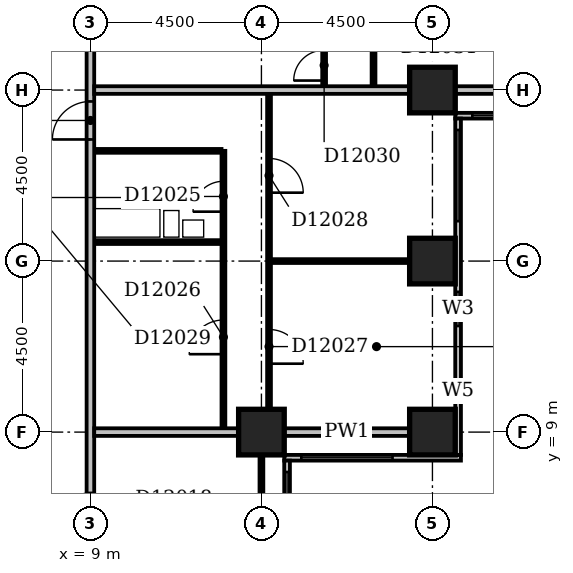
"""IFC4 building model, lengths in metres.
Left out: names, types, materials, properties, quantities, classifications, styles, units other than length and angle.
Written with IfcOpenShell. Run it as: python <this file> out.ifc"""

import sys

from ifc_helpers import new_model, si_unit, direction, frame, frame_2d, origin, origin_2d, place, context, subcontext, project, spatial, rectangle, extrude, element, fill, save


model = new_model("IFC4")
c1 = context("Model", 3, precision=1e-05, world=origin(), true_north=direction((0.0, 1.0)))
c2 = subcontext(c1, "Body", "Model", "MODEL_VIEW")
j1 = project(units=[si_unit("LENGTHUNIT", "METRE"), si_unit("PLANEANGLEUNIT", "RADIAN")], contexts=[c1])
p1 = place(None, origin())
s1 = spatial("IfcSite", under=j1, at=p1, CompositionType="ELEMENT")
p2 = place(p1, origin())
s2 = spatial("IfcBuilding", under=s1, at=p2, CompositionType="ELEMENT")
p3 = place(p2, frame((0.0, 0.0, 54.2)))
s3 = spatial("IfcBuildingStorey", under=s2, at=p3, CompositionType="ELEMENT", Elevation=54.2)
for number, where, z_axis, x_axis in (
    (1, (13.5, 9.0, -0.3), (0.0, 0.0, 1.0), (1.0, 0.0, 0.0)),
    (2, (18.0, 9.0, -0.3), (0.0, 0.0, 1.0), (1.0, 0.0, 0.0)),
    (3, (18.0, 13.5, -0.3), (0.0, 0.0, 1.0), (1.0, 0.0, 0.0)),
    (4, (18.0, 18.0, -0.3), (0.0, 0.0, 1.0), (1.0, 0.0, 0.0)),
):
    element("IfcColumn", number, at=place(p3, frame(where, z_axis=z_axis, x_axis=x_axis)), inside=s3, PredefinedType="COLUMN", context=c2, shape_type="SweptSolid", body=[
        extrude(rectangle(XDim=1.2, YDim=1.2, at=origin_2d()), origin(), (0.0, 0.0, 1.0), 3.6),
    ])
p4 = place(p3, frame((14.175, 3.9, 0.0), z_axis=(0.0, 0.0, 1.0), x_axis=(0.0, 1.0, 0.0)))
e5 = element("IfcWall", 5, at=p4, inside=s3, PredefinedType="STANDARD", context=c2, shape_type="SweptSolid", body=[
    extrude(rectangle(XDim=4.35, YDim=0.15, at=frame_2d((2.175, 0.0))), origin(), (0.0, 0.0, 1.0), 2.7),
])
p5 = place(p4, frame((1.65, 0.0, 0.6)))
e6 = element("IfcOpeningElement", 6, at=p5, cuts=e5, PredefinedType="OPENING", context=c2, shape_type="SweptSolid", body=[
    extrude(rectangle(XDim=2.4, YDim=1.8, at=frame_2d((1.2, 0.9))), frame((0.0, 0.087, 0.0), z_axis=(0.0, -1.0, 0.0), x_axis=(1.0, 0.0, 0.0)), (0.0, 0.0, 1.0), 0.174),
])
p6 = place(p3, frame((14.1, 8.325, 0.0), z_axis=(0.0, 0.0, 1.0), x_axis=(1.0, 0.0, 0.0)))
e7 = element("IfcWall", 7, at=p6, inside=s3, PredefinedType="STANDARD", context=c2, shape_type="SweptSolid", body=[
    extrude(rectangle(XDim=4.65, YDim=0.15, at=frame_2d((2.325, 0.0))), origin(), (0.0, 0.0, 1.0), 2.7),
])
p7 = place(p6, frame((0.45, 0.0, 0.6)))
e8 = element("IfcOpeningElement", 8, at=p7, cuts=e7, PredefinedType="OPENING", context=c2, shape_type="SweptSolid", body=[
    extrude(rectangle(XDim=2.4, YDim=1.8, at=frame_2d((1.2, 0.9))), frame((0.0, 0.087, 0.0), z_axis=(0.0, -1.0, 0.0), x_axis=(1.0, 0.0, 0.0)), (0.0, 0.0, 1.0), 0.174),
])
p8 = place(p3, frame((18.675, 8.4, 0.0), z_axis=(0.0, 0.0, 1.0), x_axis=(0.0, 1.0, 0.0)))
e9 = element("IfcWall", 9, at=p8, inside=s3, PredefinedType="STANDARD", context=c2, shape_type="SweptSolid", body=[
    extrude(rectangle(XDim=8.85, YDim=0.15, at=frame_2d((4.425, 0.0))), origin(), (0.0, 0.0, 1.0), 2.7),
])
p9 = place(p8, frame((1.461, 0.0, 0.6)))
e10 = element("IfcOpeningElement", 10, at=p9, cuts=e9, PredefinedType="OPENING", context=c2, shape_type="SweptSolid", body=[
    extrude(rectangle(XDim=0.45, YDim=1.8, at=frame_2d((0.225, 0.9))), frame((0.0, 0.087, 0.0), z_axis=(0.0, -1.0, 0.0), x_axis=(1.0, 0.0, 0.0)), (0.0, 0.0, 1.0), 0.174),
])
p10 = place(p8, frame((3.391, 0.0, 0.6)))
e11 = element("IfcOpeningElement", 11, at=p10, cuts=e9, PredefinedType="OPENING", context=c2, shape_type="SweptSolid", body=[
    extrude(rectangle(XDim=0.9, YDim=1.8, at=frame_2d((0.45, 0.9))), frame((0.0, 0.087, 0.0), z_axis=(0.0, -1.0, 0.0), x_axis=(1.0, 0.0, 0.0)), (0.0, 0.0, 1.0), 0.174),
])
p11 = place(p8, frame((6.15, 0.0, 0.6)))
e12 = element("IfcOpeningElement", 12, at=p11, cuts=e9, PredefinedType="OPENING", context=c2, shape_type="SweptSolid", body=[
    extrude(rectangle(XDim=2.4, YDim=1.8, at=frame_2d((1.2, 0.9))), frame((0.0, 0.087, 0.0), z_axis=(0.0, -1.0, 0.0), x_axis=(1.0, 0.0, 0.0)), (0.0, 0.0, 1.0), 0.174),
])
p12 = place(p3, frame((18.6, 17.325, 0.0), z_axis=(0.0, 0.0, 1.0), x_axis=(1.0, 0.0, 0.0)))
e13 = element("IfcWall", 13, at=p12, inside=s3, PredefinedType="STANDARD", context=c2, shape_type="SweptSolid", body=[
    extrude(rectangle(XDim=4.65, YDim=0.15, at=frame_2d((2.325, 0.0))), origin(), (0.0, 0.0, 1.0), 2.7),
])
p13 = place(p12, frame((0.45, 0.0, 0.6)))
e14 = element("IfcOpeningElement", 14, at=p13, cuts=e13, PredefinedType="OPENING", context=c2, shape_type="SweptSolid", body=[
    extrude(rectangle(XDim=2.4, YDim=1.8, at=frame_2d((1.2, 0.9))), frame((0.0, 0.087, 0.0), z_axis=(0.0, -1.0, 0.0), x_axis=(1.0, 0.0, 0.0)), (0.0, 0.0, 1.0), 0.174),
])
p14 = place(p3, frame((9.0, 5.0, 0.0), z_axis=(0.0, 0.0, 1.0), x_axis=(0.0, 1.0, 0.0)))
e15 = element("IfcWall", 15, at=p14, inside=s3, PredefinedType="PARTITIONING", context=c2, shape_type="SweptSolid", body=[
    extrude(rectangle(XDim=44.5, YDim=0.2, at=frame_2d((22.25, 0.0))), origin(), (0.0, 0.0, 1.0), 3.3),
])
p15 = place(p14, frame((28.45, 0.0, 0.0)))
e16 = element("IfcOpeningElement", 16, at=p15, cuts=e15, PredefinedType="OPENING", context=c2, shape_type="SweptSolid", body=[
    extrude(rectangle(XDim=1.0, YDim=2.1, at=frame_2d((0.5, 1.05))), frame((0.0, 0.112, 0.0), z_axis=(0.0, -1.0, 0.0), x_axis=(1.0, 0.0, 0.0)), (0.0, 0.0, 1.0), 0.224),
])
p16 = place(p14, frame((17.8, 0.0, 0.0)))
e17 = element("IfcOpeningElement", 17, at=p16, cuts=e15, PredefinedType="OPENING", context=c2, shape_type="SweptSolid", body=[
    extrude(rectangle(XDim=1.0, YDim=2.1, at=frame_2d((0.5, 1.05))), frame((0.0, 0.112, 0.0), z_axis=(0.0, -1.0, 0.0), x_axis=(1.0, 0.0, 0.0)), (0.0, 0.0, 1.0), 0.224),
])
p17 = place(p14, frame((14.55, 0.0, 0.0)))
e18 = element("IfcOpeningElement", 18, at=p17, cuts=e15, PredefinedType="OPENING", context=c2, shape_type="SweptSolid", body=[
    extrude(rectangle(XDim=1.0, YDim=2.1, at=frame_2d((0.5, 1.05))), frame((0.0, 0.112, 0.0), z_axis=(0.0, -1.0, 0.0), x_axis=(1.0, 0.0, 0.0)), (0.0, 0.0, 1.0), 0.224),
])
p18 = place(p14, frame((11.7, 0.0, 0.0)))
e19 = element("IfcOpeningElement", 19, at=p18, cuts=e15, PredefinedType="OPENING", context=c2, shape_type="SweptSolid", body=[
    extrude(rectangle(XDim=1.0, YDim=2.1, at=frame_2d((0.5, 1.05))), frame((0.0, 0.112, 0.0), z_axis=(0.0, -1.0, 0.0), x_axis=(1.0, 0.0, 0.0)), (0.0, 0.0, 1.0), 0.224),
])
p19 = place(p14, frame((35.0, 0.0, 0.0)))
e20 = element("IfcOpeningElement", 20, at=p19, cuts=e15, PredefinedType="OPENING", context=c2, shape_type="SweptSolid", body=[
    extrude(rectangle(XDim=0.9, YDim=2.1, at=frame_2d((0.45, 1.05))), frame((0.0, 0.112, 0.0), z_axis=(0.0, -1.0, 0.0), x_axis=(1.0, 0.0, 0.0)), (0.0, 0.0, 1.0), 0.224),
])
p20 = place(p14, frame((1.5, 0.0, 0.0)))
e21 = element("IfcOpeningElement", 21, at=p20, cuts=e15, PredefinedType="OPENING", context=c2, shape_type="SweptSolid", body=[
    extrude(rectangle(XDim=0.9, YDim=2.1, at=frame_2d((0.45, 1.05))), frame((0.0, 0.112, 0.0), z_axis=(0.0, -1.0, 0.0), x_axis=(1.0, 0.0, 0.0)), (0.0, 0.0, 1.0), 0.224),
])
p21 = place(p3, frame((13.5, 5.1, 0.0), z_axis=(0.0, 0.0, 1.0), x_axis=(0.0, 1.0, 0.0)))
e22 = element("IfcWall", 22, at=p21, inside=s3, PredefinedType="PARTITIONING", context=c2, shape_type="SweptSolid", body=[
    extrude(rectangle(XDim=3.3, YDim=0.1, at=frame_2d((1.65, 0.0))), origin(), (0.0, 0.0, 1.0), 2.7),
])
p22 = place(p3, frame((9.1, 9.0, 0.0), z_axis=(0.0, 0.0, 1.0), x_axis=(1.0, 0.0, 0.0)))
e23 = element("IfcWall", 23, at=p22, inside=s3, PredefinedType="PARTITIONING", context=c2, shape_type="SweptSolid", body=[
    extrude(rectangle(XDim=3.8, YDim=0.2, at=frame_2d((1.9, 0.0))), origin(), (0.0, 0.0, 1.0), 3.3),
])
p23 = place(p3, frame((14.1, 9.0, 0.0), z_axis=(0.0, 0.0, 1.0), x_axis=(1.0, 0.0, 0.0)))
e24 = element("IfcWall", 24, at=p23, inside=s3, PredefinedType="PARTITIONING", context=c2, shape_type="SweptSolid", body=[
    extrude(rectangle(XDim=3.3, YDim=0.2, at=frame_2d((1.65, 0.0))), origin(), (0.0, 0.0, 1.0), 2.7),
])
p24 = place(p3, frame((12.5, 9.1, 0.0), z_axis=(0.0, 0.0, 1.0), x_axis=(0.0, 1.0, 0.0)))
e25 = element("IfcWall", 25, at=p24, inside=s3, PredefinedType="PARTITIONING", context=c2, shape_type="SweptSolid", body=[
    extrude(rectangle(XDim=7.3, YDim=0.1, at=frame_2d((3.65, 0.0))), origin(), (0.0, 0.0, 1.0), 3.3),
])
p25 = place(p24, frame((5.7, 0.0, 0.0)))
e26 = element("IfcOpeningElement", 26, at=p25, cuts=e25, PredefinedType="OPENING", context=c2, shape_type="SweptSolid", body=[
    extrude(rectangle(XDim=0.8, YDim=2.1, at=frame_2d((0.4, 1.05))), frame((0.0, 0.062, 0.0), z_axis=(0.0, -1.0, 0.0), x_axis=(1.0, 0.0, 0.0)), (0.0, 0.0, 1.0), 0.124),
])
p26 = place(p24, frame((1.95, 0.0, 0.0)))
e27 = element("IfcOpeningElement", 27, at=p26, cuts=e25, PredefinedType="OPENING", context=c2, shape_type="SweptSolid", body=[
    extrude(rectangle(XDim=0.9, YDim=2.1, at=frame_2d((0.45, 1.05))), frame((0.0, 0.062, 0.0), z_axis=(0.0, -1.0, 0.0), x_axis=(1.0, 0.0, 0.0)), (0.0, 0.0, 1.0), 0.124),
])
p27 = place(p3, frame((13.7, 9.6, 0.0), z_axis=(0.0, 0.0, 1.0), x_axis=(0.0, 1.0, 0.0)))
e28 = element("IfcWall", 28, at=p27, inside=s3, PredefinedType="PARTITIONING", context=c2, shape_type="SweptSolid", body=[
    extrude(rectangle(XDim=8.3, YDim=0.1, at=frame_2d((4.15, 0.0))), origin(), (0.0, 0.0, 1.0), 3.3),
])
p28 = place(p27, frame((1.2, 0.0, 0.0)))
e29 = element("IfcOpeningElement", 29, at=p28, cuts=e28, PredefinedType="OPENING", context=c2, shape_type="SweptSolid", body=[
    extrude(rectangle(XDim=0.9, YDim=2.1, at=frame_2d((0.45, 1.05))), frame((0.0, 0.062, 0.0), z_axis=(0.0, -1.0, 0.0), x_axis=(1.0, 0.0, 0.0)), (0.0, 0.0, 1.0), 0.124),
])
p29 = place(p27, frame((5.7, 0.0, 0.0)))
e30 = element("IfcOpeningElement", 30, at=p29, cuts=e28, PredefinedType="OPENING", context=c2, shape_type="SweptSolid", body=[
    extrude(rectangle(XDim=0.9, YDim=2.1, at=frame_2d((0.45, 1.05))), frame((0.0, 0.062, 0.0), z_axis=(0.0, -1.0, 0.0), x_axis=(1.0, 0.0, 0.0)), (0.0, 0.0, 1.0), 0.124),
])
p30 = place(p3, frame((13.75, 13.5, 0.0), z_axis=(0.0, 0.0, 1.0), x_axis=(1.0, 0.0, 0.0)))
e31 = element("IfcWall", 31, at=p30, inside=s3, PredefinedType="PARTITIONING", context=c2, shape_type="SweptSolid", body=[
    extrude(rectangle(XDim=3.65, YDim=0.1, at=frame_2d((1.825, 0.0))), origin(), (0.0, 0.0, 1.0), 3.3),
])
for number, where, z_axis, x_axis in (
    (32, (9.1, 14.0, 0.0), (0.0, 0.0, 1.0), (1.0, 0.0, 0.0)),
    (33, (9.1, 16.4, 0.0), (0.0, 0.0, 1.0), (1.0, 0.0, 0.0)),
):
    element("IfcWall", number, at=place(p3, frame(where, z_axis=z_axis, x_axis=x_axis)), inside=s3, PredefinedType="PLUMBINGWALL", context=c2, shape_type="SweptSolid", body=[
        extrude(rectangle(XDim=3.35, YDim=0.1, at=frame_2d((1.675, 0.0))), origin(), (0.0, 0.0, 1.0), 3.3),
    ])
p31 = place(p3, frame((9.1, 18.0, 0.0), z_axis=(0.0, 0.0, 1.0), x_axis=(1.0, 0.0, 0.0)))
e34 = element("IfcWall", 34, at=p31, inside=s3, PredefinedType="PARTITIONING", context=c2, shape_type="SweptSolid", body=[
    extrude(rectangle(XDim=8.3, YDim=0.2, at=frame_2d((4.15, 0.0))), origin(), (0.0, 0.0, 1.0), 2.6),
])
p32 = place(p3, frame((18.6, 18.0, 0.0), z_axis=(0.0, 0.0, 1.0), x_axis=(1.0, 0.0, 0.0)))
e35 = element("IfcWall", 35, at=p32, inside=s3, PredefinedType="PARTITIONING", context=c2, shape_type="SweptSolid", body=[
    extrude(rectangle(XDim=3.3, YDim=0.2, at=frame_2d((1.65, 0.0))), origin(), (0.0, 0.0, 1.0), 2.7),
])
p33 = place(p3, frame((15.15, 18.1, 0.0), z_axis=(0.0, 0.0, 1.0), x_axis=(0.0, 1.0, 0.0)))
e36 = element("IfcWall", 36, at=p33, inside=s3, PredefinedType="PARTITIONING", context=c2, shape_type="SweptSolid", body=[
    extrude(rectangle(XDim=1.2, YDim=0.1, at=frame_2d((0.6, 0.0))), origin(), (0.0, 0.0, 1.0), 3.3),
])
p34 = place(p33, frame((0.15, 0.0, 0.0)))
e37 = element("IfcOpeningElement", 37, at=p34, cuts=e36, PredefinedType="OPENING", context=c2, shape_type="SweptSolid", body=[
    extrude(rectangle(XDim=0.8, YDim=2.1, at=frame_2d((0.4, 1.05))), frame((0.0, 0.062, 0.0), z_axis=(0.0, -1.0, 0.0), x_axis=(1.0, 0.0, 0.0)), (0.0, 0.0, 1.0), 0.124),
])
p35 = place(p3, frame((16.45, 18.1, 0.0), z_axis=(0.0, 0.0, 1.0), x_axis=(0.0, 1.0, 0.0)))
e38 = element("IfcWall", 38, at=p35, inside=s3, PredefinedType="PARTITIONING", context=c2, shape_type="SweptSolid", body=[
    extrude(rectangle(XDim=4.3, YDim=0.1, at=frame_2d((2.15, 0.0))), origin(), (0.0, 0.0, 1.0), 3.3),
])
p36 = place(p35, frame((1.7, 0.0, 0.0)))
e39 = element("IfcOpeningElement", 39, at=p36, cuts=e38, PredefinedType="OPENING", context=c2, shape_type="SweptSolid", body=[
    extrude(rectangle(XDim=0.9, YDim=2.1, at=frame_2d((0.45, 1.05))), frame((0.0, 0.062, 0.0), z_axis=(0.0, -1.0, 0.0), x_axis=(1.0, 0.0, 0.0)), (0.0, 0.0, 1.0), 0.124),
])
p37 = place(p5, origin())
e40 = element("IfcWindow", 40, at=p37, inside=s3, PartitioningType="SINGLE_PANEL", PredefinedType="WINDOW", context=c2, shape_type="SweptSolid", body=[
    extrude(rectangle(XDim=2.4, YDim=1.8, at=frame_2d((1.2, 0.9))), frame((0.0, 0.03, 0.0), z_axis=(0.0, -1.0, 0.0), x_axis=(1.0, 0.0, 0.0)), (0.0, 0.0, 1.0), 0.06),
])
fill(e6, e40)
p38 = place(p7, origin())
e41 = element("IfcWindow", 41, at=p38, inside=s3, PartitioningType="SINGLE_PANEL", PredefinedType="WINDOW", context=c2, shape_type="SweptSolid", body=[
    extrude(rectangle(XDim=2.4, YDim=1.8, at=frame_2d((1.2, 0.9))), frame((0.0, 0.03, 0.0), z_axis=(0.0, -1.0, 0.0), x_axis=(1.0, 0.0, 0.0)), (0.0, 0.0, 1.0), 0.06),
])
fill(e8, e41)
p39 = place(p9, origin())
e42 = element("IfcWindow", 42, at=p39, inside=s3, PartitioningType="SINGLE_PANEL", PredefinedType="WINDOW", context=c2, shape_type="SweptSolid", body=[
    extrude(rectangle(XDim=0.45, YDim=1.8, at=frame_2d((0.225, 0.9))), frame((0.0, 0.03, 0.0), z_axis=(0.0, -1.0, 0.0), x_axis=(1.0, 0.0, 0.0)), (0.0, 0.0, 1.0), 0.06),
])
fill(e10, e42)
p40 = place(p10, origin())
e43 = element("IfcWindow", 43, at=p40, inside=s3, PartitioningType="SINGLE_PANEL", PredefinedType="WINDOW", context=c2, shape_type="SweptSolid", body=[
    extrude(rectangle(XDim=0.9, YDim=1.8, at=frame_2d((0.45, 0.9))), frame((0.0, 0.03, 0.0), z_axis=(0.0, -1.0, 0.0), x_axis=(1.0, 0.0, 0.0)), (0.0, 0.0, 1.0), 0.06),
])
fill(e11, e43)
p41 = place(p11, origin())
e44 = element("IfcWindow", 44, at=p41, inside=s3, PartitioningType="SINGLE_PANEL", PredefinedType="WINDOW", context=c2, shape_type="SweptSolid", body=[
    extrude(rectangle(XDim=2.4, YDim=1.8, at=frame_2d((1.2, 0.9))), frame((0.0, 0.03, 0.0), z_axis=(0.0, -1.0, 0.0), x_axis=(1.0, 0.0, 0.0)), (0.0, 0.0, 1.0), 0.06),
])
fill(e12, e44)
p42 = place(p13, origin())
e45 = element("IfcWindow", 45, at=p42, inside=s3, PartitioningType="SINGLE_PANEL", PredefinedType="WINDOW", context=c2, shape_type="SweptSolid", body=[
    extrude(rectangle(XDim=2.4, YDim=1.8, at=frame_2d((1.2, 0.9))), frame((0.0, 0.03, 0.0), z_axis=(0.0, -1.0, 0.0), x_axis=(1.0, 0.0, 0.0)), (0.0, 0.0, 1.0), 0.06),
])
fill(e14, e45)
p43 = place(p18, origin())
e46 = element("IfcDoor", 46, at=p43, inside=s3, OperationType="SINGLE_SWING_LEFT", PredefinedType="DOOR", context=c2, shape_type="SweptSolid", body=[
    extrude(rectangle(XDim=1.0, YDim=2.1, at=frame_2d((0.5, 1.05))), frame((0.0, 0.025, 0.0), z_axis=(0.0, -1.0, 0.0), x_axis=(1.0, 0.0, 0.0)), (0.0, 0.0, 1.0), 0.05),
])
fill(e19, e46)
p44 = place(p25, origin())
e47 = element("IfcDoor", 47, at=p44, inside=s3, OperationType="SINGLE_SWING_LEFT", PredefinedType="DOOR", context=c2, shape_type="SweptSolid", body=[
    extrude(rectangle(XDim=0.8, YDim=2.1, at=frame_2d((0.4, 1.05))), frame((0.0, 0.025, 0.0), z_axis=(0.0, -1.0, 0.0), x_axis=(1.0, 0.0, 0.0)), (0.0, 0.0, 1.0), 0.05),
])
fill(e26, e47)
p45 = place(p26, origin())
e48 = element("IfcDoor", 48, at=p45, inside=s3, OperationType="SINGLE_SWING_LEFT", PredefinedType="DOOR", context=c2, shape_type="SweptSolid", body=[
    extrude(rectangle(XDim=0.9, YDim=2.1, at=frame_2d((0.45, 1.05))), frame((0.0, 0.025, 0.0), z_axis=(0.0, -1.0, 0.0), x_axis=(1.0, 0.0, 0.0)), (0.0, 0.0, 1.0), 0.05),
])
fill(e27, e48)
p46 = place(p28, frame((0.9, 0.0, 0.0), z_axis=(0.0, 0.0, 1.0), x_axis=(-1.0, 0.0, 0.0)))
e49 = element("IfcDoor", 49, at=p46, inside=s3, OperationType="SINGLE_SWING_RIGHT", PredefinedType="DOOR", context=c2, shape_type="SweptSolid", body=[
    extrude(rectangle(XDim=0.9, YDim=2.1, at=frame_2d((0.45, 1.05))), frame((0.0, 0.025, 0.0), z_axis=(0.0, -1.0, 0.0), x_axis=(1.0, 0.0, 0.0)), (0.0, 0.0, 1.0), 0.05),
])
fill(e29, e49)
p47 = place(p29, frame((0.9, 0.0, 0.0), z_axis=(0.0, 0.0, 1.0), x_axis=(-1.0, 0.0, 0.0)))
e50 = element("IfcDoor", 50, at=p47, inside=s3, OperationType="SINGLE_SWING_RIGHT", PredefinedType="DOOR", context=c2, shape_type="SweptSolid", body=[
    extrude(rectangle(XDim=0.9, YDim=2.1, at=frame_2d((0.45, 1.05))), frame((0.0, 0.025, 0.0), z_axis=(0.0, -1.0, 0.0), x_axis=(1.0, 0.0, 0.0)), (0.0, 0.0, 1.0), 0.05),
])
fill(e30, e50)
p48 = place(p34, origin())
e51 = element("IfcDoor", 51, at=p48, inside=s3, OperationType="SINGLE_SWING_LEFT", PredefinedType="DOOR", context=c2, shape_type="SweptSolid", body=[
    extrude(rectangle(XDim=0.8, YDim=2.1, at=frame_2d((0.4, 1.05))), frame((0.0, 0.025, 0.0), z_axis=(0.0, -1.0, 0.0), x_axis=(1.0, 0.0, 0.0)), (0.0, 0.0, 1.0), 0.05),
])
fill(e37, e51)
save(model, sys.argv[1])
